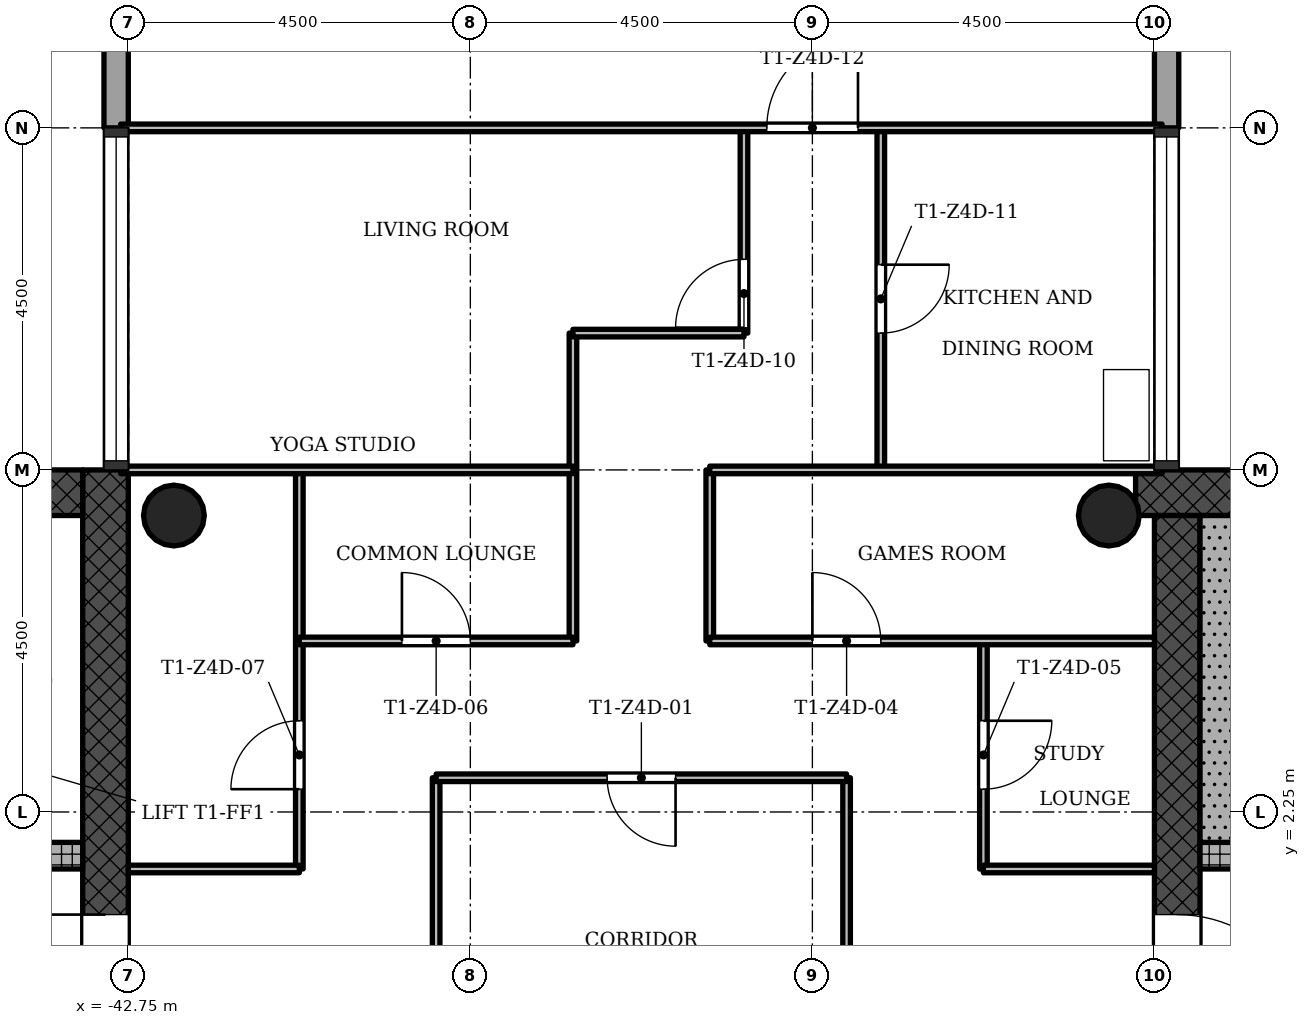
"""IFC4 building model, lengths in metres.
Left out: names, types, materials, properties, quantities, classifications, styles, units other than length and angle.
Written with IfcOpenShell. Run it as: python <this file> out.ifc"""

import sys

from ifc_helpers import new_model, si_unit, direction, frame, frame_2d, origin, origin_2d, place, context, subcontext, project, spatial, rectangle, hollow_circle, extrude, element, fill, save


model = new_model("IFC4")
c1 = context("Model", 3, precision=1e-05, world=origin(), true_north=direction((0.0, 1.0)))
c2 = subcontext(c1, "Body", "Model", "MODEL_VIEW")
j1 = project(units=[si_unit("LENGTHUNIT", "METRE"), si_unit("PLANEANGLEUNIT", "RADIAN")], contexts=[c1])
p1 = place(None, origin())
s1 = spatial("IfcSite", under=j1, at=p1, CompositionType="ELEMENT")
p2 = place(p1, origin())
s2 = spatial("IfcBuilding", under=s1, at=p2, CompositionType="ELEMENT")
p3 = place(p2, frame((0.0, 0.0, 202.8)))
s3 = spatial("IfcBuildingStorey", under=s2, at=p3, CompositionType="ELEMENT", Elevation=202.8)
p4 = place(p3, frame((-20.602, 6.45, 0.0), z_axis=(0.0, 0.0, 1.0), x_axis=(-1.0, 0.0, 0.0)))
e1 = element("IfcWall", 1, at=p4, inside=s3, PredefinedType="SHEAR", context=c2, shape_type="SweptSolid", body=[
    extrude(rectangle(XDim=8.896, YDim=0.6, at=frame_2d((4.448, 0.0))), origin(), (0.0, 0.0, 1.0), 3.4),
])
p5 = place(p3, frame((-28.95, 6.15, 0.0), z_axis=(0.0, 0.0, 1.0), x_axis=(0.0, -1.0, 0.0)))
e2 = element("IfcWall", 2, at=p5, inside=s3, PredefinedType="SHEAR", context=c2, shape_type="SweptSolid", body=[
    extrude(rectangle(XDim=12.9, YDim=0.6, at=frame_2d((6.45, 0.0))), origin(), (0.0, 0.0, 1.0), 3.4),
])
p6 = place(p5, frame((5.25, 0.0, 0.0)))
e3 = element("IfcOpeningElement", 3, at=p6, cuts=e2, PredefinedType="OPENING", context=c2, shape_type="SweptSolid", body=[
    extrude(rectangle(XDim=1.8, YDim=2.1, at=frame_2d((0.9, 1.05))), frame((0.0, 0.31, 0.0), z_axis=(0.0, -1.0, 0.0), x_axis=(1.0, 0.0, 0.0)), (0.0, 0.0, 1.0), 0.62),
])
p7 = place(p3, frame((-28.65, 1.675, 0.0), z_axis=(0.0, 0.0, 1.0), x_axis=(1.0, 0.0, 0.0)))
e4 = element("IfcWall", 4, at=p7, inside=s3, PredefinedType="SHEAR", context=c2, shape_type="SweptSolid", body=[
    extrude(rectangle(XDim=7.8, YDim=0.35, at=frame_2d((3.9, 0.0))), origin(), (0.0, 0.0, 1.0), 3.4),
])
p8 = place(p7, frame((1.05, 0.0, 0.0)))
e5 = element("IfcOpeningElement", 5, at=p8, cuts=e4, PredefinedType="OPENING", context=c2, shape_type="SweptSolid", body=[
    extrude(rectangle(XDim=0.9, YDim=2.1, at=frame_2d((0.45, 1.05))), frame((0.0, 0.185, 0.0), z_axis=(0.0, -1.0, 0.0), x_axis=(1.0, 0.0, 0.0)), (0.0, 0.0, 1.0), 0.37),
])
p9 = place(p3, frame((-43.05, -6.15, 0.0), z_axis=(0.0, 0.0, 1.0), x_axis=(0.0, 1.0, 0.0)))
e6 = element("IfcWall", 6, at=p9, inside=s3, PredefinedType="SHEAR", context=c2, shape_type="SweptSolid", body=[
    extrude(rectangle(XDim=12.9, YDim=0.6, at=frame_2d((6.45, 0.0))), origin(), (0.0, 0.0, 1.0), 3.4),
])
p10 = place(p9, frame((5.25, 0.0, 0.0)))
e7 = element("IfcOpeningElement", 7, at=p10, cuts=e6, PredefinedType="OPENING", context=c2, shape_type="SweptSolid", body=[
    extrude(rectangle(XDim=1.8, YDim=2.1, at=frame_2d((0.9, 1.05))), frame((0.0, 0.31, 0.0), z_axis=(0.0, -1.0, 0.0), x_axis=(1.0, 0.0, 0.0)), (0.0, 0.0, 1.0), 0.62),
])
p11 = place(p3, frame((-43.35, 6.45, 0.0), z_axis=(0.0, 0.0, 1.0), x_axis=(-1.0, 0.0, 0.0)))
e8 = element("IfcWall", 8, at=p11, inside=s3, PredefinedType="SHEAR", context=c2, shape_type="SweptSolid", body=[
    extrude(rectangle(XDim=8.4, YDim=0.6, at=frame_2d((4.2, 0.0))), origin(), (0.0, 0.0, 1.0), 3.4),
])
p12 = place(p3, frame((-51.15, 1.675, 0.0), z_axis=(0.0, 0.0, 1.0), x_axis=(1.0, 0.0, 0.0)))
e9 = element("IfcWall", 9, at=p12, inside=s3, PredefinedType="SHEAR", context=c2, shape_type="SweptSolid", body=[
    extrude(rectangle(XDim=7.8, YDim=0.35, at=frame_2d((3.9, 0.0))), origin(), (0.0, 0.0, 1.0), 3.4),
])
p13 = place(p12, frame((5.55, 0.0, 0.0)))
e10 = element("IfcOpeningElement", 10, at=p13, cuts=e9, PredefinedType="OPENING", context=c2, shape_type="SweptSolid", body=[
    extrude(rectangle(XDim=1.1, YDim=2.1, at=frame_2d((0.55, 1.05))), frame((0.0, 0.185, 0.0), z_axis=(0.0, -1.0, 0.0), x_axis=(1.0, 0.0, 0.0)), (0.0, 0.0, 1.0), 0.37),
])
p14 = place(p12, frame((1.2, 0.0, 0.0)))
e11 = element("IfcOpeningElement", 11, at=p14, cuts=e9, PredefinedType="OPENING", context=c2, shape_type="SweptSolid", body=[
    extrude(rectangle(XDim=1.1, YDim=2.1, at=frame_2d((0.55, 1.05))), frame((0.0, 0.185, 0.0), z_axis=(0.0, -1.0, 0.0), x_axis=(1.0, 0.0, 0.0)), (0.0, 0.0, 1.0), 0.37),
])
p15 = place(p12, frame((3.5, 0.0, 0.0)))
e12 = element("IfcOpeningElement", 12, at=p15, cuts=e9, PredefinedType="OPENING", context=c2, shape_type="SweptSolid", body=[
    extrude(rectangle(XDim=0.9, YDim=2.1, at=frame_2d((0.45, 1.05))), frame((0.0, 0.185, 0.0), z_axis=(0.0, -1.0, 0.0), x_axis=(1.0, 0.0, 0.0)), (0.0, 0.0, 1.0), 0.37),
])
for number, where, z_axis, x_axis in (
    (13, (-29.85, 6.15, 0.0), (0.0, 0.0, 1.0), (1.0, 0.0, 0.0)),
    (14, (-42.15, 6.15, 0.0), (0.0, 0.0, 1.0), (1.0, 0.0, 0.0)),
):
    element("IfcColumn", number, at=place(p3, frame(where, z_axis=z_axis, x_axis=x_axis)), inside=s3, PredefinedType="COLUMN", context=c2, shape_type="SweptSolid", body=[
        extrude(hollow_circle(Radius=0.4, WallThickness=0.028, at=origin_2d()), origin(), (0.0, 0.0, 1.0), 3.4),
    ])
p16 = place(p3, frame((-29.09, 11.25, -0.3), z_axis=(0.0, 0.0, 1.0), x_axis=(0.0, 1.0, 0.0)))
e15 = element("IfcWall", 15, at=p16, inside=s3, PredefinedType="STANDARD", context=c2, shape_type="SweptSolid", body=[
    extrude(rectangle(XDim=1.82, YDim=0.32, at=frame_2d((0.91, 0.0))), origin(), (0.0, 0.0, 1.0), 3.4),
])
p17 = place(p3, frame((-42.91, 12.75, -0.3), z_axis=(0.0, 0.0, 1.0), x_axis=(0.0, -1.0, 0.0)))
e16 = element("IfcWall", 16, at=p17, inside=s3, PredefinedType="STANDARD", context=c2, shape_type="SweptSolid", body=[
    extrude(rectangle(XDim=1.5, YDim=0.32, at=frame_2d((0.75, 0.0))), origin(), (0.0, 0.0, 1.0), 3.4),
])
p18 = place(p3, frame((-40.5, 1.5, 0.0), z_axis=(0.0, 0.0, 1.0), x_axis=(0.0, 1.0, 0.0)))
e17 = element("IfcWall", 17, at=p18, inside=s3, PredefinedType="PARTITIONING", context=c2, shape_type="SweptSolid", body=[
    extrude(rectangle(XDim=5.25, YDim=0.1, at=frame_2d((2.625, 0.0))), origin(), (0.0, 0.0, 1.0), 3.0),
])
p19 = place(p18, frame((1.05, 0.0, 0.0)))
e18 = element("IfcOpeningElement", 18, at=p19, cuts=e17, PredefinedType="OPENING", context=c2, shape_type="SweptSolid", body=[
    extrude(rectangle(XDim=0.9, YDim=2.1, at=frame_2d((0.45, 1.05))), frame((0.0, 0.06, 0.0), z_axis=(0.0, -1.0, 0.0), x_axis=(1.0, 0.0, 0.0)), (0.0, 0.0, 1.0), 0.12),
])
p20 = place(p3, frame((-38.7, -2.7, 0.0), z_axis=(0.0, 0.0, 1.0), x_axis=(0.0, 1.0, 0.0)))
e19 = element("IfcWall", 19, at=p20, inside=s3, PredefinedType="PARTITIONING", context=c2, shape_type="SweptSolid", body=[
    extrude(rectangle(XDim=5.4, YDim=0.1, at=frame_2d((2.7, 0.0))), origin(), (0.0, 0.0, 1.0), 3.0),
])
p21 = place(p3, frame((-36.9, 4.5, 0.0), z_axis=(0.0, 0.0, 1.0), x_axis=(0.0, 1.0, 0.0)))
e20 = element("IfcWall", 20, at=p21, inside=s3, PredefinedType="PARTITIONING", context=c2, shape_type="SweptSolid", body=[
    extrude(rectangle(XDim=4.05, YDim=0.1, at=frame_2d((2.025, 0.0))), origin(), (0.0, 0.0, 1.0), 3.0),
])
p22 = place(p3, frame((-35.1, 4.5, 0.0), z_axis=(0.0, 0.0, 1.0), x_axis=(0.0, 1.0, 0.0)))
e21 = element("IfcWall", 21, at=p22, inside=s3, PredefinedType="PARTITIONING", context=c2, shape_type="SweptSolid", body=[
    extrude(rectangle(XDim=2.25, YDim=0.1, at=frame_2d((1.125, 0.0))), origin(), (0.0, 0.0, 1.0), 3.0),
])
p23 = place(p3, frame((-34.65, 8.55, 0.0), z_axis=(0.0, 0.0, 1.0), x_axis=(0.0, 1.0, 0.0)))
e22 = element("IfcWall", 22, at=p23, inside=s3, PredefinedType="PARTITIONING", context=c2, shape_type="SweptSolid", body=[
    extrude(rectangle(XDim=2.7, YDim=0.1, at=frame_2d((1.35, 0.0))), origin(), (0.0, 0.0, 1.0), 3.0),
])
p24 = place(p23, frame((0.07, 0.0, 0.0)))
e23 = element("IfcOpeningElement", 23, at=p24, cuts=e22, PredefinedType="OPENING", context=c2, shape_type="SweptSolid", body=[
    extrude(rectangle(XDim=0.9, YDim=2.1, at=frame_2d((0.45, 1.05))), frame((0.0, 0.06, 0.0), z_axis=(0.0, -1.0, 0.0), x_axis=(1.0, 0.0, 0.0)), (0.0, 0.0, 1.0), 0.12),
])
p25 = place(p3, frame((-33.3, -2.7, 0.0), z_axis=(0.0, 0.0, 1.0), x_axis=(0.0, 1.0, 0.0)))
e24 = element("IfcWall", 24, at=p25, inside=s3, PredefinedType="PARTITIONING", context=c2, shape_type="SweptSolid", body=[
    extrude(rectangle(XDim=5.4, YDim=0.1, at=frame_2d((2.7, 0.0))), origin(), (0.0, 0.0, 1.0), 3.0),
])
p26 = place(p25, frame((2.25, 0.0, 0.0)))
e25 = element("IfcOpeningElement", 25, at=p26, cuts=e24, PredefinedType="OPENING", context=c2, shape_type="SweptSolid", body=[
    extrude(rectangle(XDim=0.9, YDim=2.1, at=frame_2d((0.45, 1.05))), frame((0.0, 0.06, 0.0), z_axis=(0.0, -1.0, 0.0), x_axis=(1.0, 0.0, 0.0)), (0.0, 0.0, 1.0), 0.12),
])
p27 = place(p3, frame((-32.85, 6.75, 0.0), z_axis=(0.0, 0.0, 1.0), x_axis=(0.0, 1.0, 0.0)))
e26 = element("IfcWall", 26, at=p27, inside=s3, PredefinedType="PARTITIONING", context=c2, shape_type="SweptSolid", body=[
    extrude(rectangle(XDim=4.5, YDim=0.1, at=frame_2d((2.25, 0.0))), origin(), (0.0, 0.0, 1.0), 3.0),
])
p28 = place(p27, frame((1.8, 0.0, 0.0)))
e27 = element("IfcOpeningElement", 27, at=p28, cuts=e26, PredefinedType="OPENING", context=c2, shape_type="SweptSolid", body=[
    extrude(rectangle(XDim=0.9, YDim=2.1, at=frame_2d((0.45, 1.05))), frame((0.0, 0.06, 0.0), z_axis=(0.0, -1.0, 0.0), x_axis=(1.0, 0.0, 0.0)), (0.0, 0.0, 1.0), 0.12),
])
p29 = place(p3, frame((-31.5, 1.5, 0.0), z_axis=(0.0, 0.0, 1.0), x_axis=(0.0, 1.0, 0.0)))
e28 = element("IfcWall", 28, at=p29, inside=s3, PredefinedType="PARTITIONING", context=c2, shape_type="SweptSolid", body=[
    extrude(rectangle(XDim=3.0, YDim=0.1, at=frame_2d((1.5, 0.0))), origin(), (0.0, 0.0, 1.0), 3.0),
])
p30 = place(p29, frame((1.05, 0.0, 0.0)))
e29 = element("IfcOpeningElement", 29, at=p30, cuts=e28, PredefinedType="OPENING", context=c2, shape_type="SweptSolid", body=[
    extrude(rectangle(XDim=0.9, YDim=2.1, at=frame_2d((0.45, 1.05))), frame((0.0, 0.06, 0.0), z_axis=(0.0, -1.0, 0.0), x_axis=(1.0, 0.0, 0.0)), (0.0, 0.0, 1.0), 0.12),
])
for number, where, z_axis, x_axis in (
    (30, (-42.75, 1.5, 0.0), (0.0, 0.0, 1.0), (1.0, 0.0, 0.0)),
    (31, (-31.5, 1.5, 0.0), (0.0, 0.0, 1.0), (1.0, 0.0, 0.0)),
):
    element("IfcWall", number, at=place(p3, frame(where, z_axis=z_axis, x_axis=x_axis)), inside=s3, PredefinedType="PARTITIONING", context=c2, shape_type="SweptSolid", body=[
        extrude(rectangle(XDim=2.25, YDim=0.1, at=frame_2d((1.125, 0.0))), origin(), (0.0, 0.0, 1.0), 3.0),
    ])
p31 = place(p3, frame((-38.7, 2.7, 0.0), z_axis=(0.0, 0.0, 1.0), x_axis=(1.0, 0.0, 0.0)))
e32 = element("IfcWall", 32, at=p31, inside=s3, PredefinedType="PARTITIONING", context=c2, shape_type="SweptSolid", body=[
    extrude(rectangle(XDim=5.4, YDim=0.1, at=frame_2d((2.7, 0.0))), origin(), (0.0, 0.0, 1.0), 3.0),
])
p32 = place(p31, frame((2.25, 0.0, 0.0)))
e33 = element("IfcOpeningElement", 33, at=p32, cuts=e32, PredefinedType="OPENING", context=c2, shape_type="SweptSolid", body=[
    extrude(rectangle(XDim=0.9, YDim=2.1, at=frame_2d((0.45, 1.05))), frame((0.0, 0.06, 0.0), z_axis=(0.0, -1.0, 0.0), x_axis=(1.0, 0.0, 0.0)), (0.0, 0.0, 1.0), 0.12),
])
p33 = place(p3, frame((-40.5, 4.5, 0.0), z_axis=(0.0, 0.0, 1.0), x_axis=(1.0, 0.0, 0.0)))
e34 = element("IfcWall", 34, at=p33, inside=s3, PredefinedType="PARTITIONING", context=c2, shape_type="SweptSolid", body=[
    extrude(rectangle(XDim=3.6, YDim=0.1, at=frame_2d((1.8, 0.0))), origin(), (0.0, 0.0, 1.0), 3.0),
])
p34 = place(p33, frame((1.35, 0.0, 0.0)))
e35 = element("IfcOpeningElement", 35, at=p34, cuts=e34, PredefinedType="OPENING", context=c2, shape_type="SweptSolid", body=[
    extrude(rectangle(XDim=0.9, YDim=2.1, at=frame_2d((0.45, 1.05))), frame((0.0, 0.06, 0.0), z_axis=(0.0, -1.0, 0.0), x_axis=(1.0, 0.0, 0.0)), (0.0, 0.0, 1.0), 0.12),
])
p35 = place(p3, frame((-35.1, 4.5, 0.0), z_axis=(0.0, 0.0, 1.0), x_axis=(1.0, 0.0, 0.0)))
e36 = element("IfcWall", 36, at=p35, inside=s3, PredefinedType="PARTITIONING", context=c2, shape_type="SweptSolid", body=[
    extrude(rectangle(XDim=5.85, YDim=0.1, at=frame_2d((2.925, 0.0))), origin(), (0.0, 0.0, 1.0), 3.0),
])
p36 = place(p35, frame((1.35, 0.0, 0.0)))
e37 = element("IfcOpeningElement", 37, at=p36, cuts=e36, PredefinedType="OPENING", context=c2, shape_type="SweptSolid", body=[
    extrude(rectangle(XDim=0.9, YDim=2.1, at=frame_2d((0.45, 1.05))), frame((0.0, 0.06, 0.0), z_axis=(0.0, -1.0, 0.0), x_axis=(1.0, 0.0, 0.0)), (0.0, 0.0, 1.0), 0.12),
])
for number, where, z_axis, x_axis in (
    (38, (-42.85, 6.75, 0.0), (0.0, 0.0, 1.0), (1.0, 0.0, 0.0)),
    (39, (-35.1, 6.75, 0.0), (0.0, 0.0, 1.0), (1.0, 0.0, 0.0)),
):
    element("IfcWall", number, at=place(p3, frame(where, z_axis=z_axis, x_axis=x_axis)), inside=s3, PredefinedType="PARTITIONING", context=c2, shape_type="SweptSolid", body=[
        extrude(rectangle(XDim=5.95, YDim=0.1, at=frame_2d((2.975, 0.0))), origin(), (0.0, 0.0, 1.0), 3.0),
    ])
p37 = place(p3, frame((-36.9, 8.55, 0.0), z_axis=(0.0, 0.0, 1.0), x_axis=(1.0, 0.0, 0.0)))
e40 = element("IfcWall", 40, at=p37, inside=s3, PredefinedType="PARTITIONING", context=c2, shape_type="SweptSolid", body=[
    extrude(rectangle(XDim=2.25, YDim=0.1, at=frame_2d((1.125, 0.0))), origin(), (0.0, 0.0, 1.0), 3.0),
])
p38 = place(p3, frame((-42.85, 11.25, 0.0), z_axis=(0.0, 0.0, 1.0), x_axis=(1.0, 0.0, 0.0)))
e41 = element("IfcWall", 41, at=p38, inside=s3, PredefinedType="PARTITIONING", context=c2, shape_type="SweptSolid", body=[
    extrude(rectangle(XDim=13.7, YDim=0.1, at=frame_2d((6.85, 0.0))), origin(), (0.0, 0.0, 1.0), 3.0),
])
p39 = place(p38, frame((8.5, 0.0, 0.0)))
e42 = element("IfcOpeningElement", 42, at=p39, cuts=e41, PredefinedType="OPENING", context=c2, shape_type="SweptSolid", body=[
    extrude(rectangle(XDim=1.2, YDim=2.1, at=frame_2d((0.6, 1.05))), frame((0.0, 0.06, 0.0), z_axis=(0.0, -1.0, 0.0), x_axis=(1.0, 0.0, 0.0)), (0.0, 0.0, 1.0), 0.12),
])
p40 = place(p3, frame((-28.35, 1.85, 0.0), z_axis=(0.0, 0.0, 1.0), x_axis=(0.0, 1.0, 0.0)))
e43 = element("IfcWall", 43, at=p40, inside=s3, PredefinedType="SHEAR", context=c2, shape_type="SweptSolid", body=[
    extrude(rectangle(XDim=4.3, YDim=0.6, at=frame_2d((2.15, 0.0))), origin(), (0.0, 0.0, 1.0), 3.4),
])
p41 = place(p32, origin())
e44 = element("IfcDoor", 44, at=p41, inside=s3, OperationType="SINGLE_SWING_RIGHT", PredefinedType="DOOR", context=c2, shape_type="SweptSolid", body=[
    extrude(rectangle(XDim=0.9, YDim=2.1, at=frame_2d((0.45, 1.05))), frame((0.0, 0.025, 0.0), z_axis=(0.0, -1.0, 0.0), x_axis=(1.0, 0.0, 0.0)), (0.0, 0.0, 1.0), 0.05),
])
fill(e33, e44)
p42 = place(p36, origin())
e45 = element("IfcDoor", 45, at=p42, inside=s3, OperationType="SINGLE_SWING_RIGHT", PredefinedType="DOOR", context=c2, shape_type="SweptSolid", body=[
    extrude(rectangle(XDim=0.9, YDim=2.1, at=frame_2d((0.45, 1.05))), frame((0.0, 0.025, 0.0), z_axis=(0.0, -1.0, 0.0), x_axis=(1.0, 0.0, 0.0)), (0.0, 0.0, 1.0), 0.05),
])
fill(e37, e45)
p43 = place(p30, origin())
e46 = element("IfcDoor", 46, at=p43, inside=s3, OperationType="SINGLE_SWING_RIGHT", PredefinedType="DOOR", context=c2, shape_type="SweptSolid", body=[
    extrude(rectangle(XDim=0.9, YDim=2.1, at=frame_2d((0.45, 1.05))), frame((0.0, 0.025, 0.0), z_axis=(0.0, -1.0, 0.0), x_axis=(1.0, 0.0, 0.0)), (0.0, 0.0, 1.0), 0.05),
])
fill(e29, e46)
p44 = place(p34, origin())
e47 = element("IfcDoor", 47, at=p44, inside=s3, OperationType="SINGLE_SWING_RIGHT", PredefinedType="DOOR", context=c2, shape_type="SweptSolid", body=[
    extrude(rectangle(XDim=0.9, YDim=2.1, at=frame_2d((0.45, 1.05))), frame((0.0, 0.025, 0.0), z_axis=(0.0, -1.0, 0.0), x_axis=(1.0, 0.0, 0.0)), (0.0, 0.0, 1.0), 0.05),
])
fill(e35, e47)
p45 = place(p19, origin())
e48 = element("IfcDoor", 48, at=p45, inside=s3, OperationType="SINGLE_SWING_RIGHT", PredefinedType="DOOR", context=c2, shape_type="SweptSolid", body=[
    extrude(rectangle(XDim=0.9, YDim=2.1, at=frame_2d((0.45, 1.05))), frame((0.0, 0.025, 0.0), z_axis=(0.0, -1.0, 0.0), x_axis=(1.0, 0.0, 0.0)), (0.0, 0.0, 1.0), 0.05),
])
fill(e18, e48)
p46 = place(p24, origin())
e49 = element("IfcDoor", 49, at=p46, inside=s3, OperationType="SINGLE_SWING_RIGHT", PredefinedType="DOOR", context=c2, shape_type="SweptSolid", body=[
    extrude(rectangle(XDim=0.9, YDim=2.1, at=frame_2d((0.45, 1.05))), frame((0.0, 0.025, 0.0), z_axis=(0.0, -1.0, 0.0), x_axis=(1.0, 0.0, 0.0)), (0.0, 0.0, 1.0), 0.05),
])
fill(e23, e49)
p47 = place(p28, origin())
e50 = element("IfcDoor", 50, at=p47, inside=s3, OperationType="SINGLE_SWING_RIGHT", PredefinedType="DOOR", context=c2, shape_type="SweptSolid", body=[
    extrude(rectangle(XDim=0.9, YDim=2.1, at=frame_2d((0.45, 1.05))), frame((0.0, 0.025, 0.0), z_axis=(0.0, -1.0, 0.0), x_axis=(1.0, 0.0, 0.0)), (0.0, 0.0, 1.0), 0.05),
])
fill(e27, e50)
p48 = place(p39, origin())
e51 = element("IfcDoor", 51, at=p48, inside=s3, OperationType="SINGLE_SWING_LEFT", PredefinedType="DOOR", context=c2, shape_type="SweptSolid", body=[
    extrude(rectangle(XDim=1.2, YDim=2.1, at=frame_2d((0.6, 1.05))), frame((0.0, 0.025, 0.0), z_axis=(0.0, -1.0, 0.0), x_axis=(1.0, 0.0, 0.0)), (0.0, 0.0, 1.0), 0.05),
])
fill(e42, e51)
p49 = place(p6, origin())
e52 = element("IfcDoor", 52, at=p49, inside=s3, OperationType="SINGLE_SWING_LEFT", PredefinedType="DOOR", context=c2, shape_type="SweptSolid", body=[
    extrude(rectangle(XDim=1.8, YDim=2.1, at=frame_2d((0.9, 1.05))), frame((0.0, 0.025, 0.0), z_axis=(0.0, -1.0, 0.0), x_axis=(1.0, 0.0, 0.0)), (0.0, 0.0, 1.0), 0.05),
])
fill(e3, e52)
p50 = place(p10, origin())
e53 = element("IfcDoor", 53, at=p50, inside=s3, OperationType="SINGLE_SWING_LEFT", PredefinedType="DOOR", context=c2, shape_type="SweptSolid", body=[
    extrude(rectangle(XDim=1.8, YDim=2.1, at=frame_2d((0.9, 1.05))), frame((0.0, 0.025, 0.0), z_axis=(0.0, -1.0, 0.0), x_axis=(1.0, 0.0, 0.0)), (0.0, 0.0, 1.0), 0.05),
])
fill(e7, e53)
save(model, sys.argv[1])
